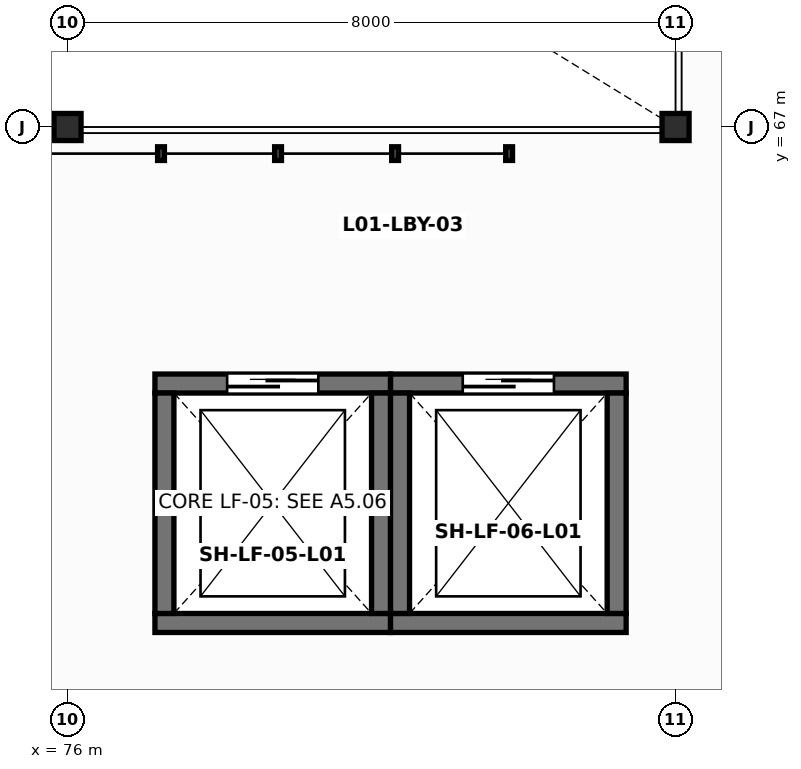
"""IFC4 building model, lengths in metres.
Left out: names, types, materials, properties, quantities, classifications, styles, units other than length and angle.
Written with IfcOpenShell. Run it as: python <this file> out.ifc"""

import sys

from ifc_helpers import new_model, si_unit, direction, frame, frame_2d, origin, origin_2d, place, context, subcontext, project, spatial, rectangle, hollow_rectangle, extrude, element, fill, save


model = new_model("IFC4")
c1 = context("Model", 3, precision=1e-05, world=origin(), true_north=direction((0.0, 1.0)))
c2 = subcontext(c1, "Body", "Model", "MODEL_VIEW")
j1 = project(units=[si_unit("LENGTHUNIT", "METRE"), si_unit("PLANEANGLEUNIT", "RADIAN")], contexts=[c1])
p1 = place(None, origin())
s1 = spatial("IfcSite", under=j1, at=p1, CompositionType="ELEMENT")
p2 = place(p1, origin())
s2 = spatial("IfcBuilding", under=s1, at=p2, CompositionType="ELEMENT")
p3 = place(p2, frame((0.0, 0.0, 6.0)))
s3 = spatial("IfcBuildingStorey", under=s2, at=p3, CompositionType="ELEMENT", Elevation=6.0)
for number, where, z_axis, x_axis in (
    (1, (76.0, 67.0, 0.0), (0.0, 0.0, 1.0), (1.0, 0.0, 0.0)),
    (2, (84.0, 67.0, 0.0), (0.0, 0.0, 1.0), (1.0, 0.0, 0.0)),
):
    element("IfcColumn", number, at=place(p3, frame(where, z_axis=z_axis, x_axis=x_axis)), inside=s3, PredefinedType="COLUMN", context=c2, shape_type="SweptSolid", body=[
        extrude(hollow_rectangle(XDim=0.356, YDim=0.356, WallThickness=0.015, at=origin_2d()), origin(), (0.0, 0.0, 1.0), 5.2),
    ])
p4 = place(p3, frame((77.15, 60.475, 0.0), z_axis=(0.0, 0.0, 1.0), x_axis=(1.0, 0.0, 0.0)))
e3 = element("IfcWall", 3, at=p4, inside=s3, PredefinedType="SOLIDWALL", context=c2, shape_type="SweptSolid", body=[
    extrude(rectangle(XDim=3.1, YDim=0.25, at=frame_2d((1.55, 0.0))), origin(), (0.0, 0.0, 1.0), 4.945),
])
p5 = place(p3, frame((80.25, 63.625, 0.0), z_axis=(0.0, 0.0, 1.0), x_axis=(-1.0, 0.0, 0.0)))
e4 = element("IfcWall", 4, at=p5, inside=s3, PredefinedType="SOLIDWALL", context=c2, shape_type="SweptSolid", body=[
    extrude(rectangle(XDim=3.1, YDim=0.25, at=frame_2d((1.55, 0.0))), origin(), (0.0, 0.0, 1.0), 4.945),
])
p6 = place(p5, frame((0.95, 0.0, 0.0)))
e5 = element("IfcOpeningElement", 5, at=p6, cuts=e4, PredefinedType="OPENING", context=c2, shape_type="SweptSolid", body=[
    extrude(rectangle(XDim=1.2, YDim=2.2, at=frame_2d((0.6, 1.1))), frame((0.0, 0.135, 0.0), z_axis=(0.0, -1.0, 0.0), x_axis=(1.0, 0.0, 0.0)), (0.0, 0.0, 1.0), 0.27),
])
for number, where, z_axis, x_axis in (
    (6, (80.125, 60.6, 0.0), (0.0, 0.0, 1.0), (0.0, 1.0, 0.0)),
    (7, (77.275, 63.5, 0.0), (0.0, 0.0, 1.0), (0.0, -1.0, 0.0)),
):
    element("IfcWall", number, at=place(p3, frame(where, z_axis=z_axis, x_axis=x_axis)), inside=s3, PredefinedType="SOLIDWALL", context=c2, shape_type="SweptSolid", body=[
        extrude(rectangle(XDim=2.9, YDim=0.25, at=frame_2d((1.45, 0.0))), origin(), (0.0, 0.0, 1.0), 4.945),
    ])
p7 = place(p3, frame((80.25, 60.475, 0.0), z_axis=(0.0, 0.0, 1.0), x_axis=(1.0, 0.0, 0.0)))
e8 = element("IfcWall", 8, at=p7, inside=s3, PredefinedType="SOLIDWALL", context=c2, shape_type="SweptSolid", body=[
    extrude(rectangle(XDim=3.1, YDim=0.25, at=frame_2d((1.55, 0.0))), origin(), (0.0, 0.0, 1.0), 4.945),
])
p8 = place(p3, frame((83.35, 63.625, 0.0), z_axis=(0.0, 0.0, 1.0), x_axis=(-1.0, 0.0, 0.0)))
e9 = element("IfcWall", 9, at=p8, inside=s3, PredefinedType="SOLIDWALL", context=c2, shape_type="SweptSolid", body=[
    extrude(rectangle(XDim=3.1, YDim=0.25, at=frame_2d((1.55, 0.0))), origin(), (0.0, 0.0, 1.0), 4.945),
])
p9 = place(p8, frame((0.95, 0.0, 0.0)))
e10 = element("IfcOpeningElement", 10, at=p9, cuts=e9, PredefinedType="OPENING", context=c2, shape_type="SweptSolid", body=[
    extrude(rectangle(XDim=1.2, YDim=2.2, at=frame_2d((0.6, 1.1))), frame((0.0, 0.135, 0.0), z_axis=(0.0, -1.0, 0.0), x_axis=(1.0, 0.0, 0.0)), (0.0, 0.0, 1.0), 0.27),
])
for number, where, z_axis, x_axis in (
    (11, (83.225, 60.6, 0.0), (0.0, 0.0, 1.0), (0.0, 1.0, 0.0)),
    (12, (80.375, 63.5, 0.0), (0.0, 0.0, 1.0), (0.0, -1.0, 0.0)),
):
    element("IfcWall", number, at=place(p3, frame(where, z_axis=z_axis, x_axis=x_axis)), inside=s3, PredefinedType="SOLIDWALL", context=c2, shape_type="SweptSolid", body=[
        extrude(rectangle(XDim=2.9, YDim=0.25, at=frame_2d((1.45, 0.0))), origin(), (0.0, 0.0, 1.0), 4.945),
    ])
p10 = place(p6, frame((1.2, 0.0, 0.0), z_axis=(0.0, 0.0, 1.0), x_axis=(-1.0, 0.0, 0.0)))
e13 = element("IfcDoor", 13, at=p10, inside=s3, OperationType="DOUBLE_DOOR_SLIDING", PredefinedType="DOOR", context=c2, shape_type="SweptSolid", body=[
    extrude(rectangle(XDim=1.2, YDim=2.2, at=frame_2d((0.6, 1.1))), frame((0.0, 0.025, 0.0), z_axis=(0.0, -1.0, 0.0), x_axis=(1.0, 0.0, 0.0)), (0.0, 0.0, 1.0), 0.05),
])
fill(e5, e13)
p11 = place(p9, frame((1.2, 0.0, 0.0), z_axis=(0.0, 0.0, 1.0), x_axis=(-1.0, 0.0, 0.0)))
e14 = element("IfcDoor", 14, at=p11, inside=s3, OperationType="DOUBLE_DOOR_SLIDING", PredefinedType="DOOR", context=c2, shape_type="SweptSolid", body=[
    extrude(rectangle(XDim=1.2, YDim=2.2, at=frame_2d((0.6, 1.1))), frame((0.0, 0.025, 0.0), z_axis=(0.0, -1.0, 0.0), x_axis=(1.0, 0.0, 0.0)), (0.0, 0.0, 1.0), 0.05),
])
fill(e10, e14)
save(model, sys.argv[1])
